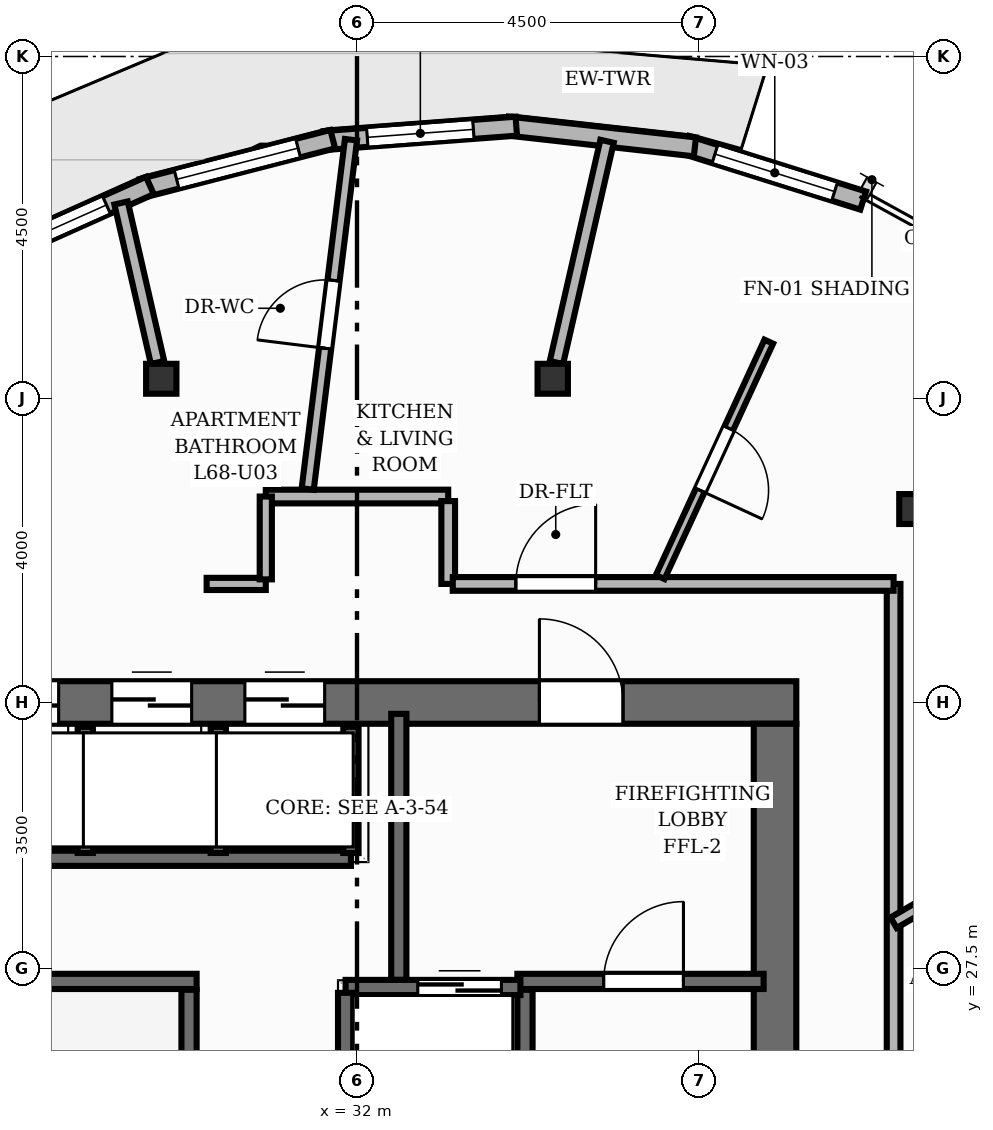
"""IFC4 building model, lengths in metres.
Left out: names, types, materials, properties, quantities, classifications, styles, units other than length and angle.
Written with IfcOpenShell. Run it as: python <this file> out.ifc"""

import sys

from ifc_helpers import new_model, si_unit, direction, frame, frame_2d, origin, origin_2d, place, context, subcontext, project, spatial, rectangle, i_section, extrude, element, fill, save


model = new_model("IFC4")
c1 = context("Model", 3, precision=1e-05, world=origin(), true_north=direction((0.0, 1.0)))
c2 = subcontext(c1, "Body", "Model", "MODEL_VIEW")
j1 = project(units=[si_unit("LENGTHUNIT", "METRE"), si_unit("PLANEANGLEUNIT", "RADIAN")], contexts=[c1])
p1 = place(None, origin())
s1 = spatial("IfcSite", under=j1, at=p1, CompositionType="ELEMENT")
p2 = place(p1, origin())
s2 = spatial("IfcBuilding", under=s1, at=p2, CompositionType="ELEMENT")
p3 = place(p2, frame((0.0, 0.0, 227.04)))
s3 = spatial("IfcBuildingStorey", under=s2, at=p3, CompositionType="ELEMENT", Elevation=227.04)
p4 = place(p3, frame((26.22, 31.0, 0.0), z_axis=(0.0, 0.0, 1.0), x_axis=(1.0, 0.0, 0.0)))
e1 = element("IfcWall", 1, at=p4, inside=s3, PredefinedType="SHEAR", context=c2, shape_type="SweptSolid", body=[
    extrude(rectangle(XDim=11.56, YDim=0.56, at=frame_2d((5.78, 0.0))), origin(), (0.0, 0.0, 1.0), 3.2),
])
p5 = place(p4, frame((8.18, 0.0, 0.0)))
e2 = element("IfcOpeningElement", 2, at=p5, cuts=e1, PredefinedType="OPENING", context=c2, shape_type="SweptSolid", body=[
    extrude(rectangle(XDim=1.1, YDim=2.15, at=frame_2d((0.55, 1.075))), frame((0.0, 0.29, 0.0), z_axis=(0.0, -1.0, 0.0), x_axis=(1.0, 0.0, 0.0)), (0.0, 0.0, 1.0), 0.58),
])
p6 = place(p4, frame((0.805, 0.0, 0.0)))
e3 = element("IfcOpeningElement", 3, at=p6, cuts=e1, PredefinedType="OPENING", context=c2, shape_type="SweptSolid", body=[
    extrude(rectangle(XDim=1.05, YDim=2.15, at=frame_2d((0.525, 1.075))), frame((0.0, 0.29, 0.0), z_axis=(0.0, -1.0, 0.0), x_axis=(1.0, 0.0, 0.0)), (0.0, 0.0, 1.0), 0.58),
])
p7 = place(p4, frame((2.555, 0.0, 0.0)))
e4 = element("IfcOpeningElement", 4, at=p7, cuts=e1, PredefinedType="OPENING", context=c2, shape_type="SweptSolid", body=[
    extrude(rectangle(XDim=1.05, YDim=2.15, at=frame_2d((0.525, 1.075))), frame((0.0, 0.29, 0.0), z_axis=(0.0, -1.0, 0.0), x_axis=(1.0, 0.0, 0.0)), (0.0, 0.0, 1.0), 0.58),
])
p8 = place(p4, frame((4.305, 0.0, 0.0)))
e5 = element("IfcOpeningElement", 5, at=p8, cuts=e1, PredefinedType="OPENING", context=c2, shape_type="SweptSolid", body=[
    extrude(rectangle(XDim=1.05, YDim=2.15, at=frame_2d((0.525, 1.075))), frame((0.0, 0.29, 0.0), z_axis=(0.0, -1.0, 0.0), x_axis=(1.0, 0.0, 0.0)), (0.0, 0.0, 1.0), 0.58),
])
p9 = place(p3, frame((37.5, 17.28, 0.0), z_axis=(0.0, 0.0, 1.0), x_axis=(0.0, 1.0, 0.0)))
e6 = element("IfcWall", 6, at=p9, inside=s3, PredefinedType="SHEAR", context=c2, shape_type="SweptSolid", body=[
    extrude(rectangle(XDim=13.44, YDim=0.56, at=frame_2d((6.72, 0.0))), origin(), (0.0, 0.0, 1.0), 3.2),
])
for number, where, z_axis, x_axis in (
    (7, (39.333, 33.545, 0.0), (0.0, 0.0, 1.0), (1.0, 0.0, 0.0)),
    (8, (34.575, 35.26, 0.0), (0.0, 0.0, 1.0), (1.0, 0.0, 0.0)),
    (9, (29.425, 35.26, 0.0), (0.0, 0.0, 1.0), (1.0, 0.0, 0.0)),
):
    element("IfcColumn", number, at=place(p3, frame(where, z_axis=z_axis, x_axis=x_axis)), inside=s3, PredefinedType="COLUMN", context=c2, shape_type="SweptSolid", body=[
        extrude(i_section(OverallWidth=0.399, OverallDepth=0.394, WebThickness=0.023, FlangeThickness=0.037, at=origin_2d()), origin(), (0.0, 0.0, 1.0), 3.2),
    ])
p10 = place(p3, frame((36.334, 38.334, 0.0), z_axis=(0.0, 0.0, 1.0), x_axis=(0.95407801166, -0.299558254212, 0.0)))
e10 = element("IfcWall", 10, at=p10, inside=s3, PredefinedType="SOLIDWALL", context=c2, shape_type="SweptSolid", body=[
    extrude(rectangle(XDim=2.437, YDim=0.25, at=frame_2d((1.218, 0.0))), origin(), (0.0, 0.0, 1.0), 2.96),
])
p11 = place(p10, frame((0.393, 0.0, 0.85)))
e11 = element("IfcOpeningElement", 11, at=p11, cuts=e10, PredefinedType="OPENING", context=c2, shape_type="SweptSolid", body=[
    extrude(rectangle(XDim=1.65, YDim=1.55, at=frame_2d((0.825, 0.775))), frame((0.0, 0.135, 0.0), z_axis=(0.0, -1.0, 0.0), x_axis=(1.0, 0.0, 0.0)), (0.0, 0.0, 1.0), 0.27),
])
p12 = place(p3, frame((33.983, 38.585, 0.0), z_axis=(0.0, 0.0, 1.0), x_axis=(0.993859679734, -0.110647806121, 0.0)))
e12 = element("IfcWall", 12, at=p12, inside=s3, PredefinedType="SOLIDWALL", context=c2, shape_type="SweptSolid", body=[
    extrude(rectangle(XDim=2.478, YDim=0.25, at=frame_2d((1.239, 0.0))), origin(), (0.0, 0.0, 1.0), 2.96),
])
p13 = place(p3, frame((31.571, 38.394, 0.0), z_axis=(0.0, 0.0, 1.0), x_axis=(0.997203982256, 0.074727623888, 0.0)))
e13 = element("IfcWall", 13, at=p13, inside=s3, PredefinedType="SOLIDWALL", context=c2, shape_type="SweptSolid", body=[
    extrude(rectangle(XDim=2.532, YDim=0.25, at=frame_2d((1.266, 0.0))), origin(), (0.0, 0.0, 1.0), 2.96),
])
p14 = place(p13, frame((0.566, 0.0, 0.85)))
e14 = element("IfcOpeningElement", 14, at=p14, cuts=e13, PredefinedType="OPENING", context=c2, shape_type="SweptSolid", body=[
    extrude(rectangle(XDim=1.4, YDim=1.55, at=frame_2d((0.7, 0.775))), frame((0.0, 0.135, 0.0), z_axis=(0.0, -1.0, 0.0), x_axis=(1.0, 0.0, 0.0)), (0.0, 0.0, 1.0), 0.27),
])
p15 = place(p3, frame((29.171, 37.766, 0.0), z_axis=(0.0, 0.0, 1.0), x_axis=(0.968423445169, 0.249311112562, 0.0)))
e15 = element("IfcWall", 15, at=p15, inside=s3, PredefinedType="SOLIDWALL", context=c2, shape_type="SweptSolid", body=[
    extrude(rectangle(XDim=2.592, YDim=0.25, at=frame_2d((1.296, 0.0))), origin(), (0.0, 0.0, 1.0), 2.96),
])
p16 = place(p15, frame((0.471, 0.0, 0.85)))
e16 = element("IfcOpeningElement", 16, at=p16, cuts=e15, PredefinedType="OPENING", context=c2, shape_type="SweptSolid", body=[
    extrude(rectangle(XDim=1.65, YDim=1.55, at=frame_2d((0.825, 0.775))), frame((0.0, 0.135, 0.0), z_axis=(0.0, -1.0, 0.0), x_axis=(1.0, 0.0, 0.0)), (0.0, 0.0, 1.0), 0.27),
])
p17 = place(p3, frame((26.855, 36.719, 0.0), z_axis=(0.0, 0.0, 1.0), x_axis=(0.912779399898, 0.408452894617, 0.0)))
e17 = element("IfcWall", 17, at=p17, inside=s3, PredefinedType="SOLIDWALL", context=c2, shape_type="SweptSolid", body=[
    extrude(rectangle(XDim=2.651, YDim=0.25, at=frame_2d((1.325, 0.0))), origin(), (0.0, 0.0, 1.0), 2.96),
])
p18 = place(p17, frame((0.625, 0.0, 0.85)))
e18 = element("IfcOpeningElement", 18, at=p18, cuts=e17, PredefinedType="OPENING", context=c2, shape_type="SweptSolid", body=[
    extrude(rectangle(XDim=1.4, YDim=1.52, at=frame_2d((0.7, 0.76))), frame((0.0, 0.135, 0.0), z_axis=(0.0, -1.0, 0.0), x_axis=(1.0, 0.0, 0.0)), (0.0, 0.0, 1.0), 0.27),
])
p19 = place(p3, frame((29.79, 20.78, 0.0), z_axis=(0.0, 0.0, 1.0), x_axis=(0.0, 1.0, 0.0)))
e19 = element("IfcWall", 19, at=p19, inside=s3, PredefinedType="SHEAR", context=c2, shape_type="SweptSolid", body=[
    extrude(rectangle(XDim=6.44, YDim=0.2, at=frame_2d((3.22, 0.0))), origin(), (0.0, 0.0, 1.0), 3.2),
])
p20 = place(p3, frame((26.65, 27.33, 0.0), z_axis=(0.0, 0.0, 1.0), x_axis=(1.0, 0.0, 0.0)))
e20 = element("IfcWall", 20, at=p20, inside=s3, PredefinedType="SHEAR", context=c2, shape_type="SweptSolid", body=[
    extrude(rectangle(XDim=3.24, YDim=0.2, at=frame_2d((1.62, 0.0))), origin(), (0.0, 0.0, 1.0), 3.2),
])
p21 = place(p3, frame((34.21, 20.78, 0.0), z_axis=(0.0, 0.0, 1.0), x_axis=(0.0, 1.0, 0.0)))
e21 = element("IfcWall", 21, at=p21, inside=s3, PredefinedType="SHEAR", context=c2, shape_type="SweptSolid", body=[
    extrude(rectangle(XDim=6.44, YDim=0.2, at=frame_2d((3.22, 0.0))), origin(), (0.0, 0.0, 1.0), 3.2),
])
p22 = place(p3, frame((34.11, 27.33, 0.0), z_axis=(0.0, 0.0, 1.0), x_axis=(1.0, 0.0, 0.0)))
e22 = element("IfcWall", 22, at=p22, inside=s3, PredefinedType="SHEAR", context=c2, shape_type="SweptSolid", body=[
    extrude(rectangle(XDim=3.24, YDim=0.2, at=frame_2d((1.62, 0.0))), origin(), (0.0, 0.0, 1.0), 3.2),
])
p23 = place(p22, frame((1.135, 0.0, 0.0)))
e23 = element("IfcOpeningElement", 23, at=p23, cuts=e22, PredefinedType="OPENING", context=c2, shape_type="SweptSolid", body=[
    extrude(rectangle(XDim=1.05, YDim=2.15, at=frame_2d((0.525, 1.075))), frame((0.0, 0.11, 0.0), z_axis=(0.0, -1.0, 0.0), x_axis=(1.0, 0.0, 0.0)), (0.0, 0.0, 1.0), 0.22),
])
p24 = place(p3, frame((32.55, 27.35, 0.0), z_axis=(0.0, 0.0, 1.0), x_axis=(0.0, 1.0, 0.0)))
e24 = element("IfcWall", 24, at=p24, inside=s3, PredefinedType="SHEAR", context=c2, shape_type="SweptSolid", body=[
    extrude(rectangle(XDim=3.5, YDim=0.2, at=frame_2d((1.75, 0.0))), origin(), (0.0, 0.0, 1.0), 3.2),
])
p25 = place(p3, frame((31.85, 27.25, 0.0), z_axis=(0.0, 0.0, 1.0), x_axis=(1.0, 0.0, 0.0)))
e25 = element("IfcWall", 25, at=p25, inside=s3, PredefinedType="SHEAR", context=c2, shape_type="SweptSolid", body=[
    extrude(rectangle(XDim=2.3, YDim=0.2, at=frame_2d((1.15, 0.0))), origin(), (0.0, 0.0, 1.0), 3.2),
])
p26 = place(p25, frame((0.95, 0.0, 0.0)))
e26 = element("IfcOpeningElement", 26, at=p26, cuts=e25, PredefinedType="OPENING", context=c2, shape_type="SweptSolid", body=[
    extrude(rectangle(XDim=1.1, YDim=2.15, at=frame_2d((0.55, 1.075))), frame((0.0, 0.11, 0.0), z_axis=(0.0, -1.0, 0.0), x_axis=(1.0, 0.0, 0.0)), (0.0, 0.0, 1.0), 0.22),
])
p27 = place(p3, frame((31.85, 25.47, 0.0), z_axis=(0.0, 0.0, 1.0), x_axis=(0.0, 1.0, 0.0)))
e27 = element("IfcWall", 27, at=p27, inside=s3, PredefinedType="SHEAR", context=c2, shape_type="SweptSolid", body=[
    extrude(rectangle(XDim=1.71, YDim=0.2, at=frame_2d((0.855, 0.0))), origin(), (0.0, 0.0, 1.0), 3.2),
])
p28 = place(p3, frame((26.68, 28.95, 0.0), z_axis=(0.0, 0.0, 1.0), x_axis=(1.0, 0.0, 0.0)))
e28 = element("IfcWall", 28, at=p28, inside=s3, PredefinedType="SHEAR", context=c2, shape_type="SweptSolid", body=[
    extrude(rectangle(XDim=5.24, YDim=0.2, at=frame_2d((2.62, 0.0))), origin(), (0.0, 0.0, 1.0), 3.2),
])
for number, where, z_axis, x_axis in (
    (29, (31.92, 29.02, 0.0), (0.0, 0.0, 1.0), (0.0, 1.0, 0.0)),
    (30, (28.425, 29.02, 0.0), (0.0, 0.0, 1.0), (0.0, 1.0, 0.0)),
    (31, (30.175, 29.02, 0.0), (0.0, 0.0, 1.0), (0.0, 1.0, 0.0)),
):
    element("IfcWall", number, at=place(p3, frame(where, z_axis=z_axis, x_axis=x_axis)), inside=s3, PredefinedType="SHEAR", context=c2, shape_type="SweptSolid", body=[
        extrude(rectangle(XDim=1.66, YDim=0.2, at=frame_2d((0.83, 0.0))), origin(), (0.0, 0.0, 1.0), 3.2),
    ])
p29 = place(p3, frame((34.624, 35.473, 0.0), z_axis=(0.0, 0.0, 1.0), x_axis=(0.222977992513, 0.974823478818, 0.0)))
e32 = element("IfcWall", 32, at=p29, inside=s3, PredefinedType="PARTITIONING", context=c2, shape_type="SweptSolid", body=[
    extrude(rectangle(XDim=2.986, YDim=0.18, at=frame_2d((1.493, 0.0))), origin(), (0.0, 0.0, 1.0), 2.403),
])
p30 = place(p3, frame((29.376, 35.473, 0.0), z_axis=(0.0, 0.0, 1.0), x_axis=(-0.223037236672, 0.974809925605, 0.0)))
e33 = element("IfcWall", 33, at=p30, inside=s3, PredefinedType="PARTITIONING", context=c2, shape_type="SweptSolid", body=[
    extrude(rectangle(XDim=2.153, YDim=0.18, at=frame_2d((1.077, 0.0))), origin(), (0.0, 0.0, 1.0), 2.403),
])
p31 = place(p3, frame((39.06, 32.56, 0.0), z_axis=(0.0, 0.0, 1.0), x_axis=(0.0, -1.0, 0.0)))
e34 = element("IfcWall", 34, at=p31, inside=s3, PredefinedType="PARTITIONING", context=c2, shape_type="SweptSolid", body=[
    extrude(rectangle(XDim=17.12, YDim=0.18, at=frame_2d((8.56, 0.0))), origin(), (0.0, 0.0, 1.0), 2.955),
])
p32 = place(p31, frame((8.816, 0.0, 0.0)))
e35 = element("IfcOpeningElement", 35, at=p32, cuts=e34, PredefinedType="OPENING", context=c2, shape_type="SweptSolid", body=[
    extrude(rectangle(XDim=1.05, YDim=2.15, at=frame_2d((0.525, 1.075))), frame((0.0, 0.1, 0.0), z_axis=(0.0, -1.0, 0.0), x_axis=(1.0, 0.0, 0.0)), (0.0, 0.0, 1.0), 0.2),
])
p33 = place(p3, frame((30.8, 33.71, 0.0), z_axis=(0.0, 0.0, 1.0), x_axis=(1.0, 0.0, 0.0)))
e36 = element("IfcWall", 36, at=p33, inside=s3, PredefinedType="PARTITIONING", context=c2, shape_type="SweptSolid", body=[
    extrude(rectangle(XDim=2.4, YDim=0.18, at=frame_2d((1.2, 0.0))), origin(), (0.0, 0.0, 1.0), 2.955),
])
p34 = place(p3, frame((33.2, 33.65, 0.0), z_axis=(0.0, 0.0, 1.0), x_axis=(0.0, -1.0, 0.0)))
e37 = element("IfcWall", 37, at=p34, inside=s3, PredefinedType="PARTITIONING", context=c2, shape_type="SweptSolid", body=[
    extrude(rectangle(XDim=1.09, YDim=0.18, at=frame_2d((0.545, 0.0))), origin(), (0.0, 0.0, 1.0), 2.955),
])
p35 = place(p3, frame((33.26, 32.56, 0.0), z_axis=(0.0, 0.0, 1.0), x_axis=(1.0, 0.0, 0.0)))
e38 = element("IfcWall", 38, at=p35, inside=s3, PredefinedType="PARTITIONING", context=c2, shape_type="SweptSolid", body=[
    extrude(rectangle(XDim=5.8, YDim=0.18, at=frame_2d((2.9, 0.0))), origin(), (0.0, 0.0, 1.0), 2.955),
])
p36 = place(p35, frame((0.83, 0.0, 0.0)))
e39 = element("IfcOpeningElement", 39, at=p36, cuts=e38, PredefinedType="OPENING", context=c2, shape_type="SweptSolid", body=[
    extrude(rectangle(XDim=1.05, YDim=2.15, at=frame_2d((0.525, 1.075))), frame((0.0, 0.1, 0.0), z_axis=(0.0, -1.0, 0.0), x_axis=(1.0, 0.0, 0.0)), (0.0, 0.0, 1.0), 0.2),
])
p37 = place(p3, frame((30.022, 32.56, 0.0), z_axis=(0.0, 0.0, 1.0), x_axis=(1.0, 0.0, 0.0)))
e40 = element("IfcWall", 40, at=p37, inside=s3, PredefinedType="PLUMBINGWALL", context=c2, shape_type="SweptSolid", body=[
    extrude(rectangle(XDim=0.778, YDim=0.16, at=frame_2d((0.389, 0.0))), origin(), (0.0, 0.0, 1.0), 2.955),
])
p38 = place(p3, frame((30.8, 32.62, 0.0), z_axis=(0.0, 0.0, 1.0), x_axis=(0.0, 1.0, 0.0)))
e41 = element("IfcWall", 41, at=p38, inside=s3, PredefinedType="PLUMBINGWALL", context=c2, shape_type="SweptSolid", body=[
    extrude(rectangle(XDim=1.09, YDim=0.16, at=frame_2d((0.545, 0.0))), origin(), (0.0, 0.0, 1.0), 2.955),
])
p39 = place(p3, frame((39.06, 28.103, 0.0), z_axis=(0.0, 0.0, 1.0), x_axis=(0.864584371019, 0.502487676854, 0.0)))
e42 = element("IfcWall", 42, at=p39, inside=s3, PredefinedType="PLUMBINGWALL", context=c2, shape_type="SweptSolid", body=[
    extrude(rectangle(XDim=4.314, YDim=0.16, at=frame_2d((2.157, 0.0))), origin(), (0.0, 0.0, 1.0), 2.403),
])
p40 = place(p3, frame((31.351, 33.809, 0.0), z_axis=(0.0, 0.0, 1.0), x_axis=(0.122996482144, 0.992407106676, 0.0)))
e43 = element("IfcWall", 43, at=p40, inside=s3, PredefinedType="PLUMBINGWALL", context=c2, shape_type="SweptSolid", body=[
    extrude(rectangle(XDim=4.631, YDim=0.16, at=frame_2d((2.315, 0.0))), origin(), (0.0, 0.0, 1.0), 2.692),
])
p41 = place(p40, frame((1.865, 0.0, 0.0)))
e44 = element("IfcOpeningElement", 44, at=p41, cuts=e43, PredefinedType="OPENING", context=c2, shape_type="SweptSolid", body=[
    extrude(rectangle(XDim=0.9, YDim=2.1, at=frame_2d((0.45, 1.05))), frame((0.0, 0.09, 0.0), z_axis=(0.0, -1.0, 0.0), x_axis=(1.0, 0.0, 0.0)), (0.0, 0.0, 1.0), 0.18),
])
p42 = place(p3, frame((37.417, 35.748, 0.0), z_axis=(0.0, 0.0, 1.0), x_axis=(-0.418699522362, -0.908124831713, 0.0)))
e45 = element("IfcWall", 45, at=p42, inside=s3, PredefinedType="PARTITIONING", context=c2, shape_type="SweptSolid", body=[
    extrude(rectangle(XDim=3.41, YDim=0.125, at=frame_2d((1.705, 0.0))), origin(), (0.0, 0.0, 1.0), 2.955),
])
p43 = place(p42, frame((1.255, 0.0, 0.0)))
e46 = element("IfcOpeningElement", 46, at=p43, cuts=e45, PredefinedType="OPENING", context=c2, shape_type="SweptSolid", body=[
    extrude(rectangle(XDim=0.9, YDim=2.1, at=frame_2d((0.45, 1.05))), frame((0.0, 0.073, 0.0), z_axis=(0.0, -1.0, 0.0), x_axis=(1.0, 0.0, 0.0)), (0.0, 0.0, 1.0), 0.145),
])
p44 = place(p11, origin())
e47 = element("IfcWindow", 47, at=p44, inside=s3, PartitioningType="SINGLE_PANEL", PredefinedType="WINDOW", context=c2, shape_type="SweptSolid", body=[
    extrude(rectangle(XDim=1.65, YDim=1.55, at=frame_2d((0.825, 0.775))), frame((0.0, 0.03, 0.0), z_axis=(0.0, -1.0, 0.0), x_axis=(1.0, 0.0, 0.0)), (0.0, 0.0, 1.0), 0.06),
])
fill(e11, e47)
p45 = place(p14, origin())
e48 = element("IfcWindow", 48, at=p45, inside=s3, PartitioningType="SINGLE_PANEL", PredefinedType="WINDOW", context=c2, shape_type="SweptSolid", body=[
    extrude(rectangle(XDim=1.4, YDim=1.55, at=frame_2d((0.7, 0.775))), frame((0.0, 0.03, 0.0), z_axis=(0.0, -1.0, 0.0), x_axis=(1.0, 0.0, 0.0)), (0.0, 0.0, 1.0), 0.06),
])
fill(e14, e48)
p46 = place(p16, origin())
e49 = element("IfcWindow", 49, at=p46, inside=s3, PartitioningType="SINGLE_PANEL", PredefinedType="WINDOW", context=c2, shape_type="SweptSolid", body=[
    extrude(rectangle(XDim=1.65, YDim=1.55, at=frame_2d((0.825, 0.775))), frame((0.0, 0.03, 0.0), z_axis=(0.0, -1.0, 0.0), x_axis=(1.0, 0.0, 0.0)), (0.0, 0.0, 1.0), 0.06),
])
fill(e16, e49)
p47 = place(p18, origin())
e50 = element("IfcWindow", 50, at=p47, inside=s3, PartitioningType="SINGLE_PANEL", PredefinedType="WINDOW", context=c2, shape_type="SweptSolid", body=[
    extrude(rectangle(XDim=1.4, YDim=1.52, at=frame_2d((0.7, 0.76))), frame((0.0, 0.03, 0.0), z_axis=(0.0, -1.0, 0.0), x_axis=(1.0, 0.0, 0.0)), (0.0, 0.0, 1.0), 0.06),
])
fill(e18, e50)
p48 = place(p23, origin())
e51 = element("IfcDoor", 51, at=p48, inside=s3, OperationType="SINGLE_SWING_RIGHT", PredefinedType="DOOR", context=c2, shape_type="SweptSolid", body=[
    extrude(rectangle(XDim=1.05, YDim=2.15, at=frame_2d((0.525, 1.075))), frame((0.0, 0.025, 0.0), z_axis=(0.0, -1.0, 0.0), x_axis=(1.0, 0.0, 0.0)), (0.0, 0.0, 1.0), 0.05),
])
fill(e23, e51)
p49 = place(p5, origin())
e52 = element("IfcDoor", 52, at=p49, inside=s3, OperationType="SINGLE_SWING_LEFT", PredefinedType="DOOR", context=c2, shape_type="SweptSolid", body=[
    extrude(rectangle(XDim=1.1, YDim=2.15, at=frame_2d((0.55, 1.075))), frame((0.0, 0.025, 0.0), z_axis=(0.0, -1.0, 0.0), x_axis=(1.0, 0.0, 0.0)), (0.0, 0.0, 1.0), 0.05),
])
fill(e2, e52)
p50 = place(p26, origin())
e53 = element("IfcDoor", 53, at=p50, inside=s3, OperationType="DOUBLE_DOOR_SLIDING", PredefinedType="DOOR", context=c2, shape_type="SweptSolid", body=[
    extrude(rectangle(XDim=1.1, YDim=2.15, at=frame_2d((0.55, 1.075))), frame((0.0, 0.025, 0.0), z_axis=(0.0, -1.0, 0.0), x_axis=(1.0, 0.0, 0.0)), (0.0, 0.0, 1.0), 0.05),
])
fill(e26, e53)
p51 = place(p6, origin())
e54 = element("IfcDoor", 54, at=p51, inside=s3, OperationType="DOUBLE_DOOR_SLIDING", PredefinedType="DOOR", context=c2, shape_type="SweptSolid", body=[
    extrude(rectangle(XDim=1.05, YDim=2.15, at=frame_2d((0.525, 1.075))), frame((0.0, 0.025, 0.0), z_axis=(0.0, -1.0, 0.0), x_axis=(1.0, 0.0, 0.0)), (0.0, 0.0, 1.0), 0.05),
])
fill(e3, e54)
p52 = place(p7, origin())
e55 = element("IfcDoor", 55, at=p52, inside=s3, OperationType="DOUBLE_DOOR_SLIDING", PredefinedType="DOOR", context=c2, shape_type="SweptSolid", body=[
    extrude(rectangle(XDim=1.05, YDim=2.15, at=frame_2d((0.525, 1.075))), frame((0.0, 0.025, 0.0), z_axis=(0.0, -1.0, 0.0), x_axis=(1.0, 0.0, 0.0)), (0.0, 0.0, 1.0), 0.05),
])
fill(e4, e55)
p53 = place(p8, origin())
e56 = element("IfcDoor", 56, at=p53, inside=s3, OperationType="DOUBLE_DOOR_SLIDING", PredefinedType="DOOR", context=c2, shape_type="SweptSolid", body=[
    extrude(rectangle(XDim=1.05, YDim=2.15, at=frame_2d((0.525, 1.075))), frame((0.0, 0.025, 0.0), z_axis=(0.0, -1.0, 0.0), x_axis=(1.0, 0.0, 0.0)), (0.0, 0.0, 1.0), 0.05),
])
fill(e5, e56)
p54 = place(p36, origin())
e57 = element("IfcDoor", 57, at=p54, inside=s3, OperationType="SINGLE_SWING_RIGHT", PredefinedType="DOOR", context=c2, shape_type="SweptSolid", body=[
    extrude(rectangle(XDim=1.05, YDim=2.15, at=frame_2d((0.525, 1.075))), frame((0.0, 0.025, 0.0), z_axis=(0.0, -1.0, 0.0), x_axis=(1.0, 0.0, 0.0)), (0.0, 0.0, 1.0), 0.05),
])
fill(e39, e57)
p55 = place(p41, origin())
e58 = element("IfcDoor", 58, at=p55, inside=s3, OperationType="SINGLE_SWING_LEFT", PredefinedType="DOOR", context=c2, shape_type="SweptSolid", body=[
    extrude(rectangle(XDim=0.9, YDim=2.1, at=frame_2d((0.45, 1.05))), frame((0.0, 0.025, 0.0), z_axis=(0.0, -1.0, 0.0), x_axis=(1.0, 0.0, 0.0)), (0.0, 0.0, 1.0), 0.05),
])
fill(e44, e58)
p56 = place(p43, origin())
e59 = element("IfcDoor", 59, at=p56, inside=s3, OperationType="SINGLE_SWING_RIGHT", PredefinedType="DOOR", context=c2, shape_type="SweptSolid", body=[
    extrude(rectangle(XDim=0.9, YDim=2.1, at=frame_2d((0.45, 1.05))), frame((0.0, 0.025, 0.0), z_axis=(0.0, -1.0, 0.0), x_axis=(1.0, 0.0, 0.0)), (0.0, 0.0, 1.0), 0.05),
])
fill(e46, e59)
save(model, sys.argv[1])
